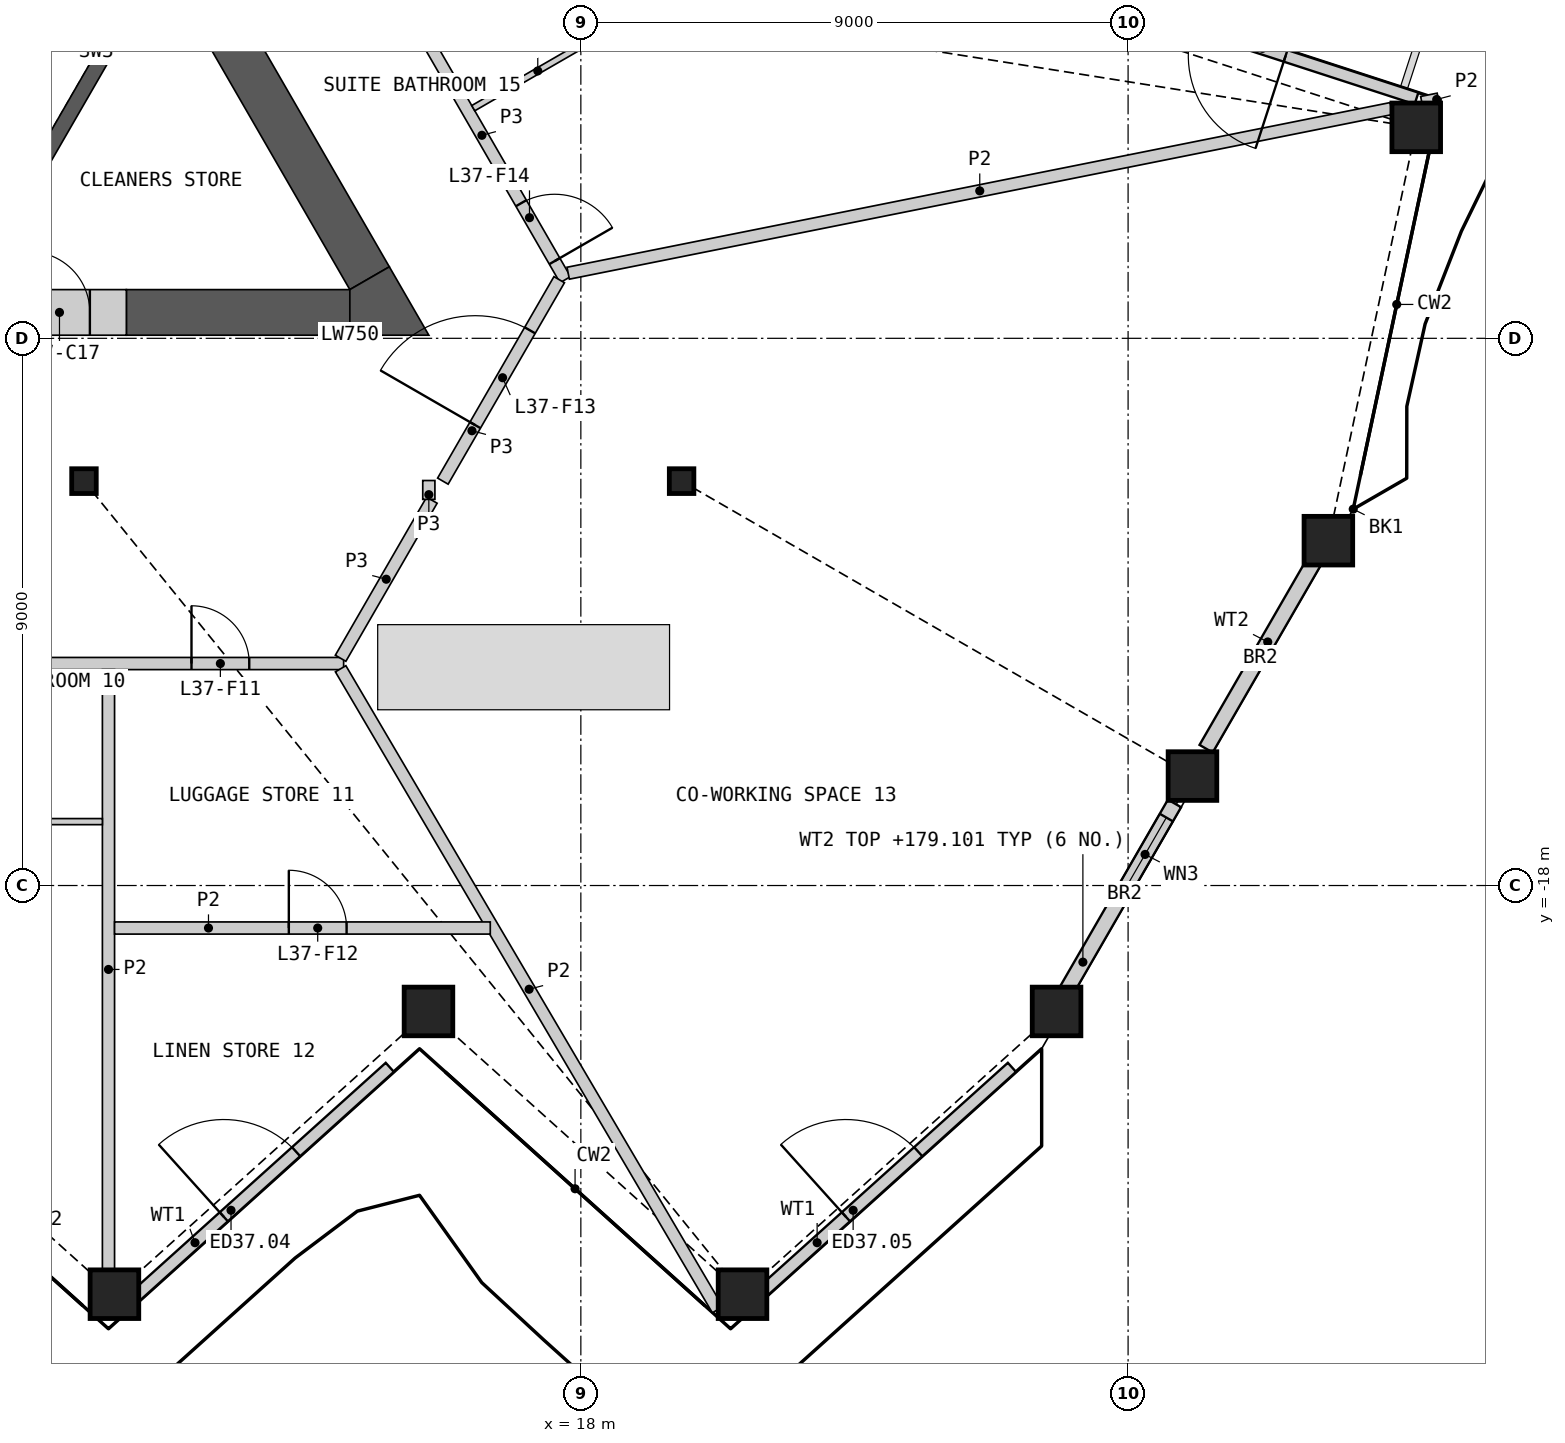
"""IFC4 building model, lengths in metres.
Left out: names, types, materials, properties, quantities, classifications, styles, units other than length and angle.
Written with IfcOpenShell. Run it as: python <this file> out.ifc"""

import sys

from ifc_helpers import new_model, si_unit, direction, frame, frame_2d, origin, origin_2d, place, context, subcontext, project, spatial, polyline, rectangle, hollow_rectangle, i_section, outline, extrude, element, fill, save


model = new_model("IFC4")
c1 = context("Model", 3, precision=1e-05, world=origin(), true_north=direction((0.0, 1.0)))
c2 = subcontext(c1, "Body", "Model", "MODEL_VIEW")
j1 = project(units=[si_unit("LENGTHUNIT", "METRE"), si_unit("PLANEANGLEUNIT", "RADIAN")], contexts=[c1])
p1 = place(None, origin())
s1 = spatial("IfcSite", under=j1, at=p1, CompositionType="ELEMENT")
p2 = place(p1, origin())
s2 = spatial("IfcBuilding", under=s1, at=p2, CompositionType="ELEMENT")
p3 = place(p2, frame((0.0, 0.0, 176.4)))
s3 = spatial("IfcBuildingStorey", under=s2, at=p3, CompositionType="ELEMENT", Elevation=176.4)
for number, where, z_axis, x_axis in (
    (1, (10.329, -24.722, 0.0), (0.0, 0.0, 1.0), (1.0, 0.0, 0.0)),
    (2, (15.494, -20.071, 0.0), (0.0, 0.0, 1.0), (1.0, 0.0, 0.0)),
    (3, (20.659, -24.722, 0.0), (0.0, 0.0, 1.0), (1.0, 0.0, 0.0)),
    (4, (25.823, -20.071, 0.0), (0.0, 0.0, 1.0), (1.0, 0.0, 0.0)),
    (5, (28.059, -16.2, 0.0), (0.0, 0.0, 1.0), (1.0, 0.0, 0.0)),
    (6, (30.294, -12.328, 0.0), (0.0, 0.0, 1.0), (1.0, 0.0, 0.0)),
    (7, (31.739, -5.53, 0.0), (0.0, 0.0, 1.0), (1.0, 0.0, 0.0)),
):
    element("IfcColumn", number, at=place(p3, frame(where, z_axis=z_axis, x_axis=x_axis)), inside=s3, PredefinedType="COLUMN", context=c2, shape_type="SweptSolid", body=[
        extrude(hollow_rectangle(XDim=0.8, YDim=0.8, WallThickness=0.05, at=origin_2d()), origin(), (0.0, 0.0, 1.0), 3.6),
    ])
for number, where, z_axis, x_axis in (
    (8, (9.828, -11.349, 0.0), (0.0, 0.0, 1.0), (1.0, 0.0, 0.0)),
    (9, (19.657, -11.349, 0.0), (0.0, 0.0, 1.0), (1.0, 0.0, 0.0)),
):
    element("IfcColumn", number, at=place(p3, frame(where, z_axis=z_axis, x_axis=x_axis)), inside=s3, PredefinedType="COLUMN", context=c2, shape_type="SweptSolid", body=[
        extrude(i_section(OverallWidth=0.404, OverallDepth=0.407, WebThickness=0.027, FlangeThickness=0.044, at=origin_2d()), origin(), (0.0, 0.0, 1.0), 3.6),
    ])
p4 = place(p3, frame((10.587, -24.836, 0.0), z_axis=(0.0, 0.0, 1.0), x_axis=(0.74315473474, 0.669119600844, 0.0)))
e10 = element("IfcWall", 10, at=p4, inside=s3, PredefinedType="SOLIDWALL", context=c2, shape_type="SweptSolid", body=[
    extrude(rectangle(XDim=5.748, YDim=0.2, at=frame_2d((2.874, 0.0))), origin(), (0.0, 0.0, 1.0), 2.701),
])
p5 = place(p4, frame((2.074, 0.0, 0.0)))
e11 = element("IfcOpeningElement", 11, at=p5, cuts=e10, PredefinedType="OPENING", context=c2, shape_type="SweptSolid", body=[
    extrude(rectangle(XDim=1.6, YDim=2.4, at=frame_2d((0.8, 1.2))), frame((0.0, 0.11, 0.0), z_axis=(0.0, -1.0, 0.0), x_axis=(1.0, 0.0, 0.0)), (0.0, 0.0, 1.0), 0.22),
])
p6 = place(p3, frame((20.818, -24.836, 0.0), z_axis=(0.0, 0.0, 1.0), x_axis=(0.74315473474, 0.669119600844, 0.0)))
e12 = element("IfcWall", 12, at=p6, inside=s3, PredefinedType="SOLIDWALL", context=c2, shape_type="SweptSolid", body=[
    extrude(rectangle(XDim=5.748, YDim=0.2, at=frame_2d((2.874, 0.0))), origin(), (0.0, 0.0, 1.0), 2.701),
])
p7 = place(p6, frame((2.074, 0.0, 0.0)))
e13 = element("IfcOpeningElement", 13, at=p7, cuts=e12, PredefinedType="OPENING", context=c2, shape_type="SweptSolid", body=[
    extrude(rectangle(XDim=1.6, YDim=2.4, at=frame_2d((0.8, 1.2))), frame((0.0, 0.11, 0.0), z_axis=(0.0, -1.0, 0.0), x_axis=(1.0, 0.0, 0.0)), (0.0, 0.0, 1.0), 0.22),
])
p8 = place(p3, frame((25.754, -20.13, 0.0), z_axis=(0.0, 0.0, 1.0), x_axis=(0.500039726511, 0.866002466458, 0.0)))
e14 = element("IfcWall", 14, at=p8, inside=s3, PredefinedType="SOLIDWALL", context=c2, shape_type="SweptSolid", body=[
    extrude(rectangle(XDim=4.019, YDim=0.25, at=frame_2d((2.009, 0.0))), origin(), (0.0, 0.0, 1.0), 2.701),
])
p9 = place(p8, frame((2.35, 0.0, 1.7)))
e15 = element("IfcOpeningElement", 15, at=p9, cuts=e14, PredefinedType="OPENING", context=c2, shape_type="SweptSolid", body=[
    extrude(rectangle(XDim=1.4, YDim=0.8, at=frame_2d((0.7, 0.4))), frame((0.0, 0.135, 0.0), z_axis=(0.0, -1.0, 0.0), x_axis=(1.0, 0.0, 0.0)), (0.0, 0.0, 1.0), 0.27),
])
p10 = place(p3, frame((28.283, -15.75, 0.0), z_axis=(0.0, 0.0, 1.0), x_axis=(0.500005680777, 0.866022123962, 0.0)))
e16 = element("IfcWall", 16, at=p10, inside=s3, PredefinedType="SOLIDWALL", context=c2, shape_type="SweptSolid", body=[
    extrude(rectangle(XDim=4.054, YDim=0.25, at=frame_2d((2.027, 0.0))), origin(), (0.0, 0.0, 1.0), 2.701),
])
p11 = place(p3, frame((31.743, -5.054, 0.0), z_axis=(0.0, 0.0, 1.0), x_axis=(-0.951061260164, 0.309002393867, 0.0)))
e17 = element("IfcWall", 17, at=p11, inside=s3, PredefinedType="SOLIDWALL", context=c2, shape_type="SweptSolid", body=[
    extrude(rectangle(XDim=5.938, YDim=0.2, at=frame_2d((2.969, 0.0))), origin(), (0.0, 0.0, 1.0), 2.701),
])
p12 = place(p11, frame((2.264, 0.0, 0.0)))
e18 = element("IfcOpeningElement", 18, at=p12, cuts=e17, PredefinedType="OPENING", context=c2, shape_type="SweptSolid", body=[
    extrude(rectangle(XDim=1.6, YDim=2.4, at=frame_2d((0.8, 1.2))), frame((0.0, 0.11, 0.0), z_axis=(0.0, -1.0, 0.0), x_axis=(1.0, 0.0, 0.0)), (0.0, 0.0, 1.0), 0.22),
])
p13 = place(p3, origin())
e19 = element("IfcWall", 19, at=p13, inside=s3, PredefinedType="SHEAR", context=c2, shape_type="SweptSolid", body=[
    extrude(outline(polyline([(8.83, -6.881), (10.374, -4.206), (10.032, -4.298), (8.738, -6.539), (8.83, -6.881)])), origin(), (0.0, 0.0, 1.0), 3.25),
])
p14 = place(p3, origin())
e20 = element("IfcWall", 20, at=p14, inside=s3, PredefinedType="SHEAR", context=c2, shape_type="SweptSolid", body=[
    extrude(outline(polyline([(10.032, -4.298), (10.374, -4.206), (5.307, -1.281), (5.182, -1.498), (10.032, -4.298)])), origin(), (0.0, 0.0, 1.0), 3.25),
])
p15 = place(p3, frame((10.525, -8.574, 0.0), z_axis=(0.0, 0.0, 1.0), x_axis=(1.0, 0.0, 0.0)))
e21 = element("IfcWall", 21, at=p15, inside=s3, PredefinedType="SHEAR", context=c2, shape_type="SweptSolid", body=[
    extrude(rectangle(XDim=3.676, YDim=0.75, at=frame_2d((1.838, 0.0))), origin(), (0.0, 0.0, 1.0), 3.25),
])
p16 = place(p3, frame((14.526, -8.011, 0.0), z_axis=(0.0, 0.0, 1.0), x_axis=(-0.499994855372, 0.866028374016, 0.0)))
e22 = element("IfcWall", 22, at=p16, inside=s3, PredefinedType="SHEAR", context=c2, shape_type="SweptSolid", body=[
    extrude(rectangle(XDim=14.301, YDim=0.75, at=frame_2d((7.15, 0.0))), origin(), (0.0, 0.0, 1.0), 3.25),
])
p17 = place(p3, origin())
e23 = element("IfcWall", 23, at=p17, inside=s3, PredefinedType="SHEAR", context=c2, shape_type="SweptSolid", body=[
    extrude(outline(polyline([(14.201, -8.949), (14.201, -8.199), (14.851, -7.824), (15.5, -8.949), (14.201, -8.949)])), origin(), (0.0, 0.0, 1.0), 3.25),
])
p18 = place(p3, frame((8.325, -8.574, 0.0), z_axis=(0.0, 0.0, 1.0), x_axis=(1.0, 0.0, 0.0)))
e24 = element("IfcWall", 24, at=p18, inside=s3, PredefinedType="SHEAR", context=c2, shape_type="SweptSolid", body=[
    extrude(rectangle(XDim=2.2, YDim=0.75, at=frame_2d((1.1, 0.0))), origin(), (0.0, 0.0, 1.0), 3.25),
])
p19 = place(p18, frame((0.6, 0.0, 0.0)))
e25 = element("IfcOpeningElement", 25, at=p19, cuts=e24, PredefinedType="OPENING", context=c2, shape_type="SweptSolid", body=[
    extrude(rectangle(XDim=1.0, YDim=2.1, at=frame_2d((0.5, 1.05))), frame((0.0, 0.385, 0.0), z_axis=(0.0, -1.0, 0.0), x_axis=(1.0, 0.0, 0.0)), (0.0, 0.0, 1.0), 0.77),
])
p20 = place(p3, frame((-14.099, -14.349, 0.0), z_axis=(0.0, 0.0, 1.0), x_axis=(1.0, 0.0, 0.0)))
e26 = element("IfcWall", 26, at=p20, inside=s3, PredefinedType="PARTITIONING", context=c2, shape_type="SweptSolid", body=[
    extrude(rectangle(XDim=28.198, YDim=0.2, at=frame_2d((14.099, 0.0))), origin(), (0.0, 0.0, 1.0), 3.25),
])
p21 = place(p20, frame((1.552, 0.0, 0.0)))
e27 = element("IfcOpeningElement", 27, at=p21, cuts=e26, PredefinedType="OPENING", context=c2, shape_type="SweptSolid", body=[
    extrude(rectangle(XDim=0.95, YDim=2.1, at=frame_2d((0.475, 1.05))), frame((0.0, 0.11, 0.0), z_axis=(0.0, -1.0, 0.0), x_axis=(1.0, 0.0, 0.0)), (0.0, 0.0, 1.0), 0.22),
])
p22 = place(p20, frame((7.677, 0.0, 0.0)))
e28 = element("IfcOpeningElement", 28, at=p22, cuts=e26, PredefinedType="OPENING", context=c2, shape_type="SweptSolid", body=[
    extrude(rectangle(XDim=1.0, YDim=2.1, at=frame_2d((0.5, 1.05))), frame((0.0, 0.11, 0.0), z_axis=(0.0, -1.0, 0.0), x_axis=(1.0, 0.0, 0.0)), (0.0, 0.0, 1.0), 0.22),
])
p23 = place(p20, frame((9.283, 0.0, 0.0)))
e29 = element("IfcOpeningElement", 29, at=p23, cuts=e26, PredefinedType="OPENING", context=c2, shape_type="SweptSolid", body=[
    extrude(rectangle(XDim=1.0, YDim=2.1, at=frame_2d((0.5, 1.05))), frame((0.0, 0.11, 0.0), z_axis=(0.0, -1.0, 0.0), x_axis=(1.0, 0.0, 0.0)), (0.0, 0.0, 1.0), 0.22),
])
p24 = place(p20, frame((17.915, 0.0, 0.0)))
e30 = element("IfcOpeningElement", 30, at=p24, cuts=e26, PredefinedType="OPENING", context=c2, shape_type="SweptSolid", body=[
    extrude(rectangle(XDim=1.0, YDim=2.1, at=frame_2d((0.5, 1.05))), frame((0.0, 0.11, 0.0), z_axis=(0.0, -1.0, 0.0), x_axis=(1.0, 0.0, 0.0)), (0.0, 0.0, 1.0), 0.22),
])
p25 = place(p20, frame((19.521, 0.0, 0.0)))
e31 = element("IfcOpeningElement", 31, at=p25, cuts=e26, PredefinedType="OPENING", context=c2, shape_type="SweptSolid", body=[
    extrude(rectangle(XDim=1.0, YDim=2.1, at=frame_2d((0.5, 1.05))), frame((0.0, 0.11, 0.0), z_axis=(0.0, -1.0, 0.0), x_axis=(1.0, 0.0, 0.0)), (0.0, 0.0, 1.0), 0.22),
])
p26 = place(p20, frame((25.696, 0.0, 0.0)))
e32 = element("IfcOpeningElement", 32, at=p26, cuts=e26, PredefinedType="OPENING", context=c2, shape_type="SweptSolid", body=[
    extrude(rectangle(XDim=0.95, YDim=2.1, at=frame_2d((0.475, 1.05))), frame((0.0, 0.11, 0.0), z_axis=(0.0, -1.0, 0.0), x_axis=(1.0, 0.0, 0.0)), (0.0, 0.0, 1.0), 0.22),
])
p27 = place(p3, frame((15.002, -3.286, 0.0), z_axis=(0.0, 0.0, 1.0), x_axis=(0.500007607708, -0.866021011428, 0.0)))
e33 = element("IfcWall", 33, at=p27, inside=s3, PredefinedType="PARTITIONING", context=c2, shape_type="SweptSolid", body=[
    extrude(rectangle(XDim=5.484, YDim=0.2, at=frame_2d((2.742, 0.0))), origin(), (0.0, 0.0, 1.0), 3.25),
])
p28 = place(p27, frame((4.032, 0.0, 0.0)))
e34 = element("IfcOpeningElement", 34, at=p28, cuts=e33, PredefinedType="OPENING", context=c2, shape_type="SweptSolid", body=[
    extrude(rectangle(XDim=1.1, YDim=2.1, at=frame_2d((0.55, 1.05))), frame((0.0, 0.11, 0.0), z_axis=(0.0, -1.0, 0.0), x_axis=(1.0, 0.0, 0.0)), (0.0, 0.0, 1.0), 0.22),
])
p29 = place(p3, frame((15.731, -11.349, 0.0), z_axis=(0.0, 0.0, 1.0), x_axis=(0.499961815444, 0.866047448526, 0.0)))
e35 = element("IfcWall", 35, at=p29, inside=s3, PredefinedType="PARTITIONING", context=c2, shape_type="SweptSolid", body=[
    extrude(rectangle(XDim=3.826, YDim=0.2, at=frame_2d((1.913, 0.0))), origin(), (0.0, 0.0, 1.0), 3.25),
])
p30 = place(p29, frame((1.064, 0.0, 0.0)))
e36 = element("IfcOpeningElement", 36, at=p30, cuts=e35, PredefinedType="OPENING", context=c2, shape_type="SweptSolid", body=[
    extrude(rectangle(XDim=1.8, YDim=2.1, at=frame_2d((0.9, 1.05))), frame((0.0, 0.11, 0.0), z_axis=(0.0, -1.0, 0.0), x_axis=(1.0, 0.0, 0.0)), (0.0, 0.0, 1.0), 0.22),
])
p31 = place(p3, frame((14.049, -14.262, 0.0), z_axis=(0.0, 0.0, 1.0), x_axis=(0.500048608389, 0.865997337899, 0.0)))
e37 = element("IfcWall", 37, at=p31, inside=s3, PredefinedType="PARTITIONING", context=c2, shape_type="SweptSolid", body=[
    extrude(rectangle(XDim=3.002, YDim=0.2, at=frame_2d((1.501, 0.0))), origin(), (0.0, 0.0, 1.0), 3.25),
])
p32 = place(p3, frame((15.5, -11.649, 0.0), z_axis=(0.0, 0.0, 1.0), x_axis=(0.0, 1.0, 0.0)))
e38 = element("IfcWall", 38, at=p32, inside=s3, PredefinedType="PARTITIONING", context=c2, shape_type="SweptSolid", body=[
    extrude(rectangle(XDim=0.31, YDim=0.2, at=frame_2d((0.155, 0.0))), origin(), (0.0, 0.0, 1.0), 3.25),
])
p33 = place(p3, frame((17.792, -7.929, 0.0), z_axis=(0.0, 0.0, 1.0), x_axis=(0.980565709097, 0.196190953266, 0.0)))
e39 = element("IfcWall", 39, at=p33, inside=s3, PredefinedType="PARTITIONING", context=c2, shape_type="SweptSolid", body=[
    extrude(rectangle(XDim=13.805, YDim=0.2, at=frame_2d((6.903, 0.0))), origin(), (0.0, 0.0, 1.0), 2.404),
])
p34 = place(p3, frame((14.05, -14.435, 0.0), z_axis=(0.0, 0.0, 1.0), x_axis=(0.50691019554, -0.861998871031, 0.0)))
e40 = element("IfcWall", 40, at=p34, inside=s3, PredefinedType="PARTITIONING", context=c2, shape_type="SweptSolid", body=[
    extrude(rectangle(XDim=12.229, YDim=0.2, at=frame_2d((6.115, 0.0))), origin(), (0.0, 0.0, 1.0), 2.404),
])
p35 = place(p3, frame((10.231, -24.312, 0.0), z_axis=(0.0, 0.0, 1.0), x_axis=(0.0, 1.0, 0.0)))
e41 = element("IfcWall", 41, at=p35, inside=s3, PredefinedType="PARTITIONING", context=c2, shape_type="SweptSolid", body=[
    extrude(rectangle(XDim=9.863, YDim=0.2, at=frame_2d((4.931, 0.0))), origin(), (0.0, 0.0, 1.0), 2.404),
])
p36 = place(p3, frame((10.331, -18.699, 0.0), z_axis=(0.0, 0.0, 1.0), x_axis=(1.0, 0.0, 0.0)))
e42 = element("IfcWall", 42, at=p36, inside=s3, PredefinedType="PARTITIONING", context=c2, shape_type="SweptSolid", body=[
    extrude(rectangle(XDim=6.179, YDim=0.2, at=frame_2d((3.09, 0.0))), origin(), (0.0, 0.0, 1.0), 2.404),
])
p37 = place(p36, frame((2.866, 0.0, 0.0)))
e43 = element("IfcOpeningElement", 43, at=p37, cuts=e42, PredefinedType="OPENING", context=c2, shape_type="SweptSolid", body=[
    extrude(rectangle(XDim=0.95, YDim=2.1, at=frame_2d((0.475, 1.05))), frame((0.0, 0.11, 0.0), z_axis=(0.0, -1.0, 0.0), x_axis=(1.0, 0.0, 0.0)), (0.0, 0.0, 1.0), 0.22),
])
p38 = place(p3, frame((31.831, -5.12, 0.0), z_axis=(0.0, 0.0, 1.0), x_axis=(0.980512850695, 0.19645495571, 0.0)))
e44 = element("IfcWall", 44, at=p38, inside=s3, PredefinedType="PARTITIONING", context=c2, shape_type="SweptSolid", body=[
    extrude(rectangle(XDim=0.277, YDim=0.2, at=frame_2d((0.139, 0.0))), origin(), (0.0, 0.0, 1.0), 2.404),
])
p39 = place(p3, frame((7.481, -16.949, 0.0), z_axis=(0.0, 0.0, 1.0), x_axis=(1.0, 0.0, 0.0)))
e45 = element("IfcWall", 45, at=p39, inside=s3, PredefinedType="PARTITIONING", context=c2, shape_type="SweptSolid", body=[
    extrude(rectangle(XDim=2.65, YDim=0.1, at=frame_2d((1.325, 0.0))), origin(), (0.0, 0.0, 1.0), 2.404),
])
p40 = place(p39, frame((0.25, 0.0, 0.0)))
e46 = element("IfcOpeningElement", 46, at=p40, cuts=e45, PredefinedType="OPENING", context=c2, shape_type="SweptSolid", body=[
    extrude(rectangle(XDim=0.95, YDim=2.1, at=frame_2d((0.475, 1.05))), frame((0.0, 0.06, 0.0), z_axis=(0.0, -1.0, 0.0), x_axis=(1.0, 0.0, 0.0)), (0.0, 0.0, 1.0), 0.12),
])
p41 = place(p3, frame((16.231, -5.215, 0.0), z_axis=(0.0, 0.0, 1.0), x_axis=(0.866057815567, 0.499943856944, 0.0)))
e47 = element("IfcWall", 47, at=p41, inside=s3, PredefinedType="PARTITIONING", context=c2, shape_type="SweptSolid", body=[
    extrude(rectangle(XDim=2.45, YDim=0.1, at=frame_2d((1.225, 0.0))), origin(), (0.0, 0.0, 1.0), 2.404),
])
p42 = place(p5, origin())
e48 = element("IfcDoor", 48, at=p42, inside=s3, OperationType="DOUBLE_DOOR_SINGLE_SWING", PredefinedType="DOOR", context=c2, shape_type="SweptSolid", body=[
    extrude(rectangle(XDim=1.6, YDim=2.4, at=frame_2d((0.8, 1.2))), frame((0.0, 0.025, 0.0), z_axis=(0.0, -1.0, 0.0), x_axis=(1.0, 0.0, 0.0)), (0.0, 0.0, 1.0), 0.05),
])
fill(e11, e48)
p43 = place(p7, origin())
e49 = element("IfcDoor", 49, at=p43, inside=s3, OperationType="DOUBLE_DOOR_SINGLE_SWING", PredefinedType="DOOR", context=c2, shape_type="SweptSolid", body=[
    extrude(rectangle(XDim=1.6, YDim=2.4, at=frame_2d((0.8, 1.2))), frame((0.0, 0.025, 0.0), z_axis=(0.0, -1.0, 0.0), x_axis=(1.0, 0.0, 0.0)), (0.0, 0.0, 1.0), 0.05),
])
fill(e13, e49)
p44 = place(p9, origin())
e50 = element("IfcWindow", 50, at=p44, inside=s3, PartitioningType="SINGLE_PANEL", PredefinedType="WINDOW", context=c2, shape_type="SweptSolid", body=[
    extrude(rectangle(XDim=1.4, YDim=0.8, at=frame_2d((0.7, 0.4))), frame((0.0, 0.03, 0.0), z_axis=(0.0, -1.0, 0.0), x_axis=(1.0, 0.0, 0.0)), (0.0, 0.0, 1.0), 0.06),
])
fill(e15, e50)
p45 = place(p12, origin())
e51 = element("IfcDoor", 51, at=p45, inside=s3, OperationType="DOUBLE_DOOR_SINGLE_SWING", PredefinedType="DOOR", context=c2, shape_type="SweptSolid", body=[
    extrude(rectangle(XDim=1.6, YDim=2.4, at=frame_2d((0.8, 1.2))), frame((0.0, 0.025, 0.0), z_axis=(0.0, -1.0, 0.0), x_axis=(1.0, 0.0, 0.0)), (0.0, 0.0, 1.0), 0.05),
])
fill(e18, e51)
p46 = place(p19, origin())
e52 = element("IfcDoor", 52, at=p46, inside=s3, OperationType="SINGLE_SWING_LEFT", PredefinedType="DOOR", context=c2, shape_type="SweptSolid", body=[
    extrude(rectangle(XDim=1.0, YDim=2.1, at=frame_2d((0.5, 1.05))), frame((0.0, 0.13, 0.0), z_axis=(0.0, -1.0, 0.0), x_axis=(1.0, 0.0, 0.0)), (0.0, 0.0, 1.0), 0.05),
])
fill(e25, e52)
p47 = place(p26, origin())
e53 = element("IfcDoor", 53, at=p47, inside=s3, OperationType="SINGLE_SWING_LEFT", PredefinedType="DOOR", context=c2, shape_type="SweptSolid", body=[
    extrude(rectangle(XDim=0.95, YDim=2.1, at=frame_2d((0.475, 1.05))), frame((0.0, 0.025, 0.0), z_axis=(0.0, -1.0, 0.0), x_axis=(1.0, 0.0, 0.0)), (0.0, 0.0, 1.0), 0.05),
])
fill(e32, e53)
p48 = place(p37, origin())
e54 = element("IfcDoor", 54, at=p48, inside=s3, OperationType="SINGLE_SWING_LEFT", PredefinedType="DOOR", context=c2, shape_type="SweptSolid", body=[
    extrude(rectangle(XDim=0.95, YDim=2.1, at=frame_2d((0.475, 1.05))), frame((0.0, 0.025, 0.0), z_axis=(0.0, -1.0, 0.0), x_axis=(1.0, 0.0, 0.0)), (0.0, 0.0, 1.0), 0.05),
])
fill(e43, e54)
p49 = place(p30, origin())
e55 = element("IfcDoor", 55, at=p49, inside=s3, OperationType="DOUBLE_DOOR_SINGLE_SWING", PredefinedType="DOOR", context=c2, shape_type="SweptSolid", body=[
    extrude(rectangle(XDim=1.8, YDim=2.1, at=frame_2d((0.9, 1.05))), frame((0.0, 0.025, 0.0), z_axis=(0.0, -1.0, 0.0), x_axis=(1.0, 0.0, 0.0)), (0.0, 0.0, 1.0), 0.05),
])
fill(e36, e55)
p50 = place(p28, origin())
e56 = element("IfcDoor", 56, at=p50, inside=s3, OperationType="SINGLE_SWING_RIGHT", PredefinedType="DOOR", context=c2, shape_type="SweptSolid", body=[
    extrude(rectangle(XDim=1.1, YDim=2.1, at=frame_2d((0.55, 1.05))), frame((0.0, 0.025, 0.0), z_axis=(0.0, -1.0, 0.0), x_axis=(1.0, 0.0, 0.0)), (0.0, 0.0, 1.0), 0.05),
])
fill(e34, e56)
save(model, sys.argv[1])
